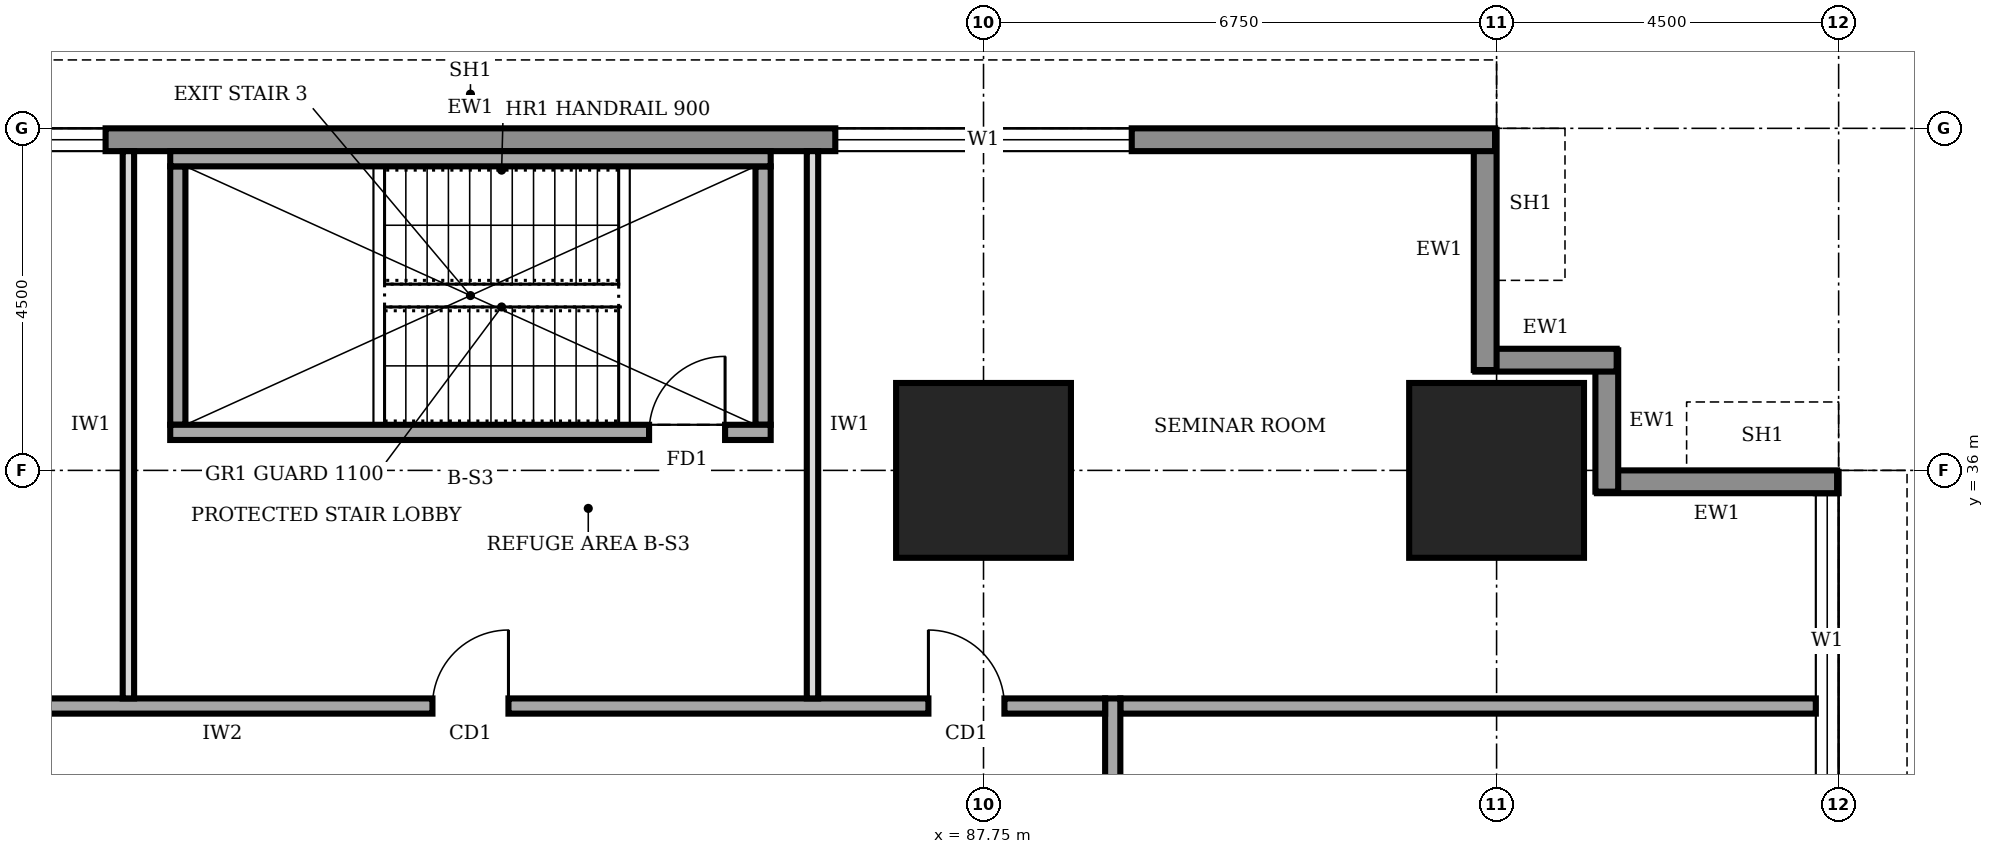
"""IFC4 building model, lengths in metres.
Left out: names, types, materials, properties, quantities, classifications, styles, units other than length and angle.
Written with IfcOpenShell. Run it as: python <this file> out.ifc"""

import sys

from ifc_helpers import new_model, si_unit, direction, frame, frame_2d, origin, origin_2d, place, context, subcontext, project, spatial, rectangle, extrude, element, fill, save


model = new_model("IFC4")
c1 = context("Model", 3, precision=1e-05, world=origin(), true_north=direction((0.0, 1.0)))
c2 = subcontext(c1, "Body", "Model", "MODEL_VIEW")
j1 = project(units=[si_unit("LENGTHUNIT", "METRE"), si_unit("PLANEANGLEUNIT", "RADIAN")], contexts=[c1])
p1 = place(None, origin())
s1 = spatial("IfcSite", under=j1, at=p1, CompositionType="ELEMENT")
p2 = place(p1, origin())
s2 = spatial("IfcBuilding", under=s1, at=p2, CompositionType="ELEMENT")
p3 = place(p2, frame((0.0, 0.0, 33.0)))
s3 = spatial("IfcBuildingStorey", under=s2, at=p3, CompositionType="ELEMENT", Elevation=33.0)
for number, where, z_axis, x_axis in (
    (1, (87.75, 36.0, 0.0), (0.0, 0.0, 1.0), (1.0, 0.0, 0.0)),
    (2, (94.5, 36.0, 0.0), (0.0, 0.0, 1.0), (1.0, 0.0, 0.0)),
):
    element("IfcColumn", number, at=place(p3, frame(where, z_axis=z_axis, x_axis=x_axis)), inside=s3, PredefinedType="COLUMN", context=c2, shape_type="SweptSolid", body=[
        extrude(rectangle(XDim=2.3, YDim=2.3, at=origin_2d()), origin(), (0.0, 0.0, 1.0), 4.0),
    ])
p4 = place(p3, frame((98.85, 4.52, 0.0), z_axis=(0.0, 0.0, 1.0), x_axis=(0.0, 1.0, 0.0)))
e3 = element("IfcWall", 3, at=p4, inside=s3, PredefinedType="STANDARD", context=c2, shape_type="SweptSolid", body=[
    extrude(rectangle(XDim=31.46, YDim=0.3, at=frame_2d((15.73, 0.0))), origin(), (0.0, 0.0, 1.0), 3.75),
])
p5 = place(p4, frame((4.78, 0.0, 0.9)))
e4 = element("IfcOpeningElement", 4, at=p5, cuts=e3, PredefinedType="OPENING", context=c2, shape_type="SweptSolid", body=[
    extrude(rectangle(XDim=3.9, YDim=2.2, at=frame_2d((1.95, 1.1))), frame((0.0, 0.16, 0.0), z_axis=(0.0, -1.0, 0.0), x_axis=(1.0, 0.0, 0.0)), (0.0, 0.0, 1.0), 0.32),
])
p6 = place(p4, frame((9.28, 0.0, 0.9)))
e5 = element("IfcOpeningElement", 5, at=p6, cuts=e3, PredefinedType="OPENING", context=c2, shape_type="SweptSolid", body=[
    extrude(rectangle(XDim=3.9, YDim=2.2, at=frame_2d((1.95, 1.1))), frame((0.0, 0.16, 0.0), z_axis=(0.0, -1.0, 0.0), x_axis=(1.0, 0.0, 0.0)), (0.0, 0.0, 1.0), 0.32),
])
p7 = place(p4, frame((13.78, 0.0, 0.9)))
e6 = element("IfcOpeningElement", 6, at=p7, cuts=e3, PredefinedType="OPENING", context=c2, shape_type="SweptSolid", body=[
    extrude(rectangle(XDim=3.9, YDim=2.2, at=frame_2d((1.95, 1.1))), frame((0.0, 0.16, 0.0), z_axis=(0.0, -1.0, 0.0), x_axis=(1.0, 0.0, 0.0)), (0.0, 0.0, 1.0), 0.32),
])
p8 = place(p4, frame((18.28, 0.0, 0.9)))
e7 = element("IfcOpeningElement", 7, at=p8, cuts=e3, PredefinedType="OPENING", context=c2, shape_type="SweptSolid", body=[
    extrude(rectangle(XDim=3.9, YDim=2.2, at=frame_2d((1.95, 1.1))), frame((0.0, 0.16, 0.0), z_axis=(0.0, -1.0, 0.0), x_axis=(1.0, 0.0, 0.0)), (0.0, 0.0, 1.0), 0.32),
])
p9 = place(p4, frame((22.78, 0.0, 0.9)))
e8 = element("IfcOpeningElement", 8, at=p9, cuts=e3, PredefinedType="OPENING", context=c2, shape_type="SweptSolid", body=[
    extrude(rectangle(XDim=3.9, YDim=2.2, at=frame_2d((1.95, 1.1))), frame((0.0, 0.16, 0.0), z_axis=(0.0, -1.0, 0.0), x_axis=(1.0, 0.0, 0.0)), (0.0, 0.0, 1.0), 0.32),
])
p10 = place(p4, frame((27.28, 0.0, 0.9)))
e9 = element("IfcOpeningElement", 9, at=p10, cuts=e3, PredefinedType="OPENING", context=c2, shape_type="SweptSolid", body=[
    extrude(rectangle(XDim=3.9, YDim=2.2, at=frame_2d((1.95, 1.1))), frame((0.0, 0.16, 0.0), z_axis=(0.0, -1.0, 0.0), x_axis=(1.0, 0.0, 0.0)), (0.0, 0.0, 1.0), 0.32),
])
p11 = place(p3, frame((98.98, 35.85, 0.0), z_axis=(0.0, 0.0, 1.0), x_axis=(-1.0, 0.0, 0.0)))
e10 = element("IfcWall", 10, at=p11, inside=s3, PredefinedType="STANDARD", context=c2, shape_type="SweptSolid", body=[
    extrude(rectangle(XDim=3.16, YDim=0.3, at=frame_2d((1.58, 0.0))), origin(), (0.0, 0.0, 1.0), 2.85),
])
for number, where, z_axis, x_axis in (
    (11, (95.95, 35.72, 0.0), (0.0, 0.0, 1.0), (0.0, 1.0, 0.0)),
    (12, (96.08, 37.45, 0.0), (0.0, 0.0, 1.0), (-1.0, 0.0, 0.0)),
):
    element("IfcWall", number, at=place(p3, frame(where, z_axis=z_axis, x_axis=x_axis)), inside=s3, PredefinedType="STANDARD", context=c2, shape_type="SweptSolid", body=[
        extrude(rectangle(XDim=1.86, YDim=0.3, at=frame_2d((0.93, 0.0))), origin(), (0.0, 0.0, 1.0), 3.75),
    ])
p12 = place(p3, frame((94.35, 37.32, 0.0), z_axis=(0.0, 0.0, 1.0), x_axis=(0.0, 1.0, 0.0)))
e13 = element("IfcWall", 13, at=p12, inside=s3, PredefinedType="STANDARD", context=c2, shape_type="SweptSolid", body=[
    extrude(rectangle(XDim=3.16, YDim=0.3, at=frame_2d((1.58, 0.0))), origin(), (0.0, 0.0, 1.0), 2.85),
])
p13 = place(p3, frame((94.48, 40.35, 0.0), z_axis=(0.0, 0.0, 1.0), x_axis=(-1.0, 0.0, 0.0)))
e14 = element("IfcWall", 14, at=p13, inside=s3, PredefinedType="STANDARD", context=c2, shape_type="SweptSolid", body=[
    extrude(rectangle(XDim=26.96, YDim=0.3, at=frame_2d((13.48, 0.0))), origin(), (0.0, 0.0, 1.0), 3.75),
])
p14 = place(p13, frame((22.78, 0.0, 0.9)))
e15 = element("IfcOpeningElement", 15, at=p14, cuts=e14, PredefinedType="OPENING", context=c2, shape_type="SweptSolid", body=[
    extrude(rectangle(XDim=3.9, YDim=2.2, at=frame_2d((1.95, 1.1))), frame((0.0, 0.16, 0.0), z_axis=(0.0, -1.0, 0.0), x_axis=(1.0, 0.0, 0.0)), (0.0, 0.0, 1.0), 0.32),
])
p15 = place(p13, frame((18.28, 0.0, 0.9)))
e16 = element("IfcOpeningElement", 16, at=p15, cuts=e14, PredefinedType="OPENING", context=c2, shape_type="SweptSolid", body=[
    extrude(rectangle(XDim=3.9, YDim=2.2, at=frame_2d((1.95, 1.1))), frame((0.0, 0.16, 0.0), z_axis=(0.0, -1.0, 0.0), x_axis=(1.0, 0.0, 0.0)), (0.0, 0.0, 1.0), 0.32),
])
p16 = place(p13, frame((4.78, 0.0, 0.9)))
e17 = element("IfcOpeningElement", 17, at=p16, cuts=e14, PredefinedType="OPENING", context=c2, shape_type="SweptSolid", body=[
    extrude(rectangle(XDim=3.9, YDim=2.2, at=frame_2d((1.95, 1.1))), frame((0.0, 0.16, 0.0), z_axis=(0.0, -1.0, 0.0), x_axis=(1.0, 0.0, 0.0)), (0.0, 0.0, 1.0), 0.32),
])
p17 = place(p3, frame((89.45, 9.2, 0.0), z_axis=(0.0, 0.0, 1.0), x_axis=(0.0, 1.0, 0.0)))
e18 = element("IfcWall", 18, at=p17, inside=s3, PredefinedType="SOLIDWALL", context=c2, shape_type="SweptSolid", body=[
    extrude(rectangle(XDim=23.8, YDim=0.2, at=frame_2d((11.9, 0.0))), origin(), (0.0, 0.0, 1.0), 3.75),
])
p18 = place(p17, frame((1.55, 0.0, 0.0)))
e19 = element("IfcOpeningElement", 19, at=p18, cuts=e18, PredefinedType="OPENING", context=c2, shape_type="SweptSolid", body=[
    extrude(rectangle(XDim=1.0, YDim=2.1, at=frame_2d((0.5, 1.05))), frame((0.0, 0.11, 0.0), z_axis=(0.0, -1.0, 0.0), x_axis=(1.0, 0.0, 0.0)), (0.0, 0.0, 1.0), 0.22),
])
p19 = place(p17, frame((5.05, 0.0, 0.0)))
e20 = element("IfcOpeningElement", 20, at=p19, cuts=e18, PredefinedType="OPENING", context=c2, shape_type="SweptSolid", body=[
    extrude(rectangle(XDim=0.9, YDim=2.1, at=frame_2d((0.45, 1.05))), frame((0.0, 0.11, 0.0), z_axis=(0.0, -1.0, 0.0), x_axis=(1.0, 0.0, 0.0)), (0.0, 0.0, 1.0), 0.22),
])
p20 = place(p17, frame((8.25, 0.0, 0.0)))
e21 = element("IfcOpeningElement", 21, at=p20, cuts=e18, PredefinedType="OPENING", context=c2, shape_type="SweptSolid", body=[
    extrude(rectangle(XDim=0.9, YDim=2.1, at=frame_2d((0.45, 1.05))), frame((0.0, 0.11, 0.0), z_axis=(0.0, -1.0, 0.0), x_axis=(1.0, 0.0, 0.0)), (0.0, 0.0, 1.0), 0.22),
])
p21 = place(p17, frame((13.8, 0.0, 0.0)))
e22 = element("IfcOpeningElement", 22, at=p21, cuts=e18, PredefinedType="OPENING", context=c2, shape_type="SweptSolid", body=[
    extrude(rectangle(XDim=0.9, YDim=2.1, at=frame_2d((0.45, 1.05))), frame((0.0, 0.11, 0.0), z_axis=(0.0, -1.0, 0.0), x_axis=(1.0, 0.0, 0.0)), (0.0, 0.0, 1.0), 0.22),
])
p22 = place(p17, frame((16.3, 0.0, 0.0)))
e23 = element("IfcOpeningElement", 23, at=p22, cuts=e18, PredefinedType="OPENING", context=c2, shape_type="SweptSolid", body=[
    extrude(rectangle(XDim=1.0, YDim=2.1, at=frame_2d((0.5, 1.05))), frame((0.0, 0.11, 0.0), z_axis=(0.0, -1.0, 0.0), x_axis=(1.0, 0.0, 0.0)), (0.0, 0.0, 1.0), 0.22),
])
p23 = place(p17, frame((11.2, 0.0, 0.0)))
e24 = element("IfcOpeningElement", 24, at=p23, cuts=e18, PredefinedType="OPENING", context=c2, shape_type="SweptSolid", body=[
    extrude(rectangle(XDim=1.0, YDim=2.1, at=frame_2d((0.5, 1.05))), frame((0.0, 0.11, 0.0), z_axis=(0.0, -1.0, 0.0), x_axis=(1.0, 0.0, 0.0)), (0.0, 0.0, 1.0), 0.22),
])
p24 = place(p17, frame((20.3, 0.0, 0.0)))
e25 = element("IfcOpeningElement", 25, at=p24, cuts=e18, PredefinedType="OPENING", context=c2, shape_type="SweptSolid", body=[
    extrude(rectangle(XDim=1.0, YDim=2.1, at=frame_2d((0.5, 1.05))), frame((0.0, 0.11, 0.0), z_axis=(0.0, -1.0, 0.0), x_axis=(1.0, 0.0, 0.0)), (0.0, 0.0, 1.0), 0.22),
])
p25 = place(p3, frame((89.35, 32.9, 0.0), z_axis=(0.0, 0.0, 1.0), x_axis=(-1.0, 0.0, 0.0)))
e26 = element("IfcWall", 26, at=p25, inside=s3, PredefinedType="SOLIDWALL", context=c2, shape_type="SweptSolid", body=[
    extrude(rectangle(XDim=16.9, YDim=0.2, at=frame_2d((8.45, 0.0))), origin(), (0.0, 0.0, 1.0), 3.75),
])
p26 = place(p25, frame((14.375, 0.0, 0.0)))
e27 = element("IfcOpeningElement", 27, at=p26, cuts=e26, PredefinedType="OPENING", context=c2, shape_type="SweptSolid", body=[
    extrude(rectangle(XDim=1.0, YDim=2.1, at=frame_2d((0.5, 1.05))), frame((0.0, 0.11, 0.0), z_axis=(0.0, -1.0, 0.0), x_axis=(1.0, 0.0, 0.0)), (0.0, 0.0, 1.0), 0.22),
])
p27 = place(p25, frame((7.85, 0.0, 0.0)))
e28 = element("IfcOpeningElement", 28, at=p27, cuts=e26, PredefinedType="OPENING", context=c2, shape_type="SweptSolid", body=[
    extrude(rectangle(XDim=1.0, YDim=2.1, at=frame_2d((0.5, 1.05))), frame((0.0, 0.11, 0.0), z_axis=(0.0, -1.0, 0.0), x_axis=(1.0, 0.0, 0.0)), (0.0, 0.0, 1.0), 0.22),
])
p28 = place(p25, frame((1.325, 0.0, 0.0)))
e29 = element("IfcOpeningElement", 29, at=p28, cuts=e26, PredefinedType="OPENING", context=c2, shape_type="SweptSolid", body=[
    extrude(rectangle(XDim=1.0, YDim=2.1, at=frame_2d((0.5, 1.05))), frame((0.0, 0.11, 0.0), z_axis=(0.0, -1.0, 0.0), x_axis=(1.0, 0.0, 0.0)), (0.0, 0.0, 1.0), 0.22),
])
p29 = place(p3, frame((89.55, 32.9, 0.0), z_axis=(0.0, 0.0, 1.0), x_axis=(1.0, 0.0, 0.0)))
e30 = element("IfcWall", 30, at=p29, inside=s3, PredefinedType="SOLIDWALL", context=c2, shape_type="SweptSolid", body=[
    extrude(rectangle(XDim=9.15, YDim=0.2, at=frame_2d((4.575, 0.0))), origin(), (0.0, 0.0, 1.0), 3.75),
])
for number, where, z_axis, x_axis in (
    (31, (76.5, 33.0, 0.0), (0.0, 0.0, 1.0), (0.0, 1.0, 0.0)),
    (32, (85.5, 33.0, 0.0), (0.0, 0.0, 1.0), (0.0, 1.0, 0.0)),
):
    element("IfcWall", number, at=place(p3, frame(where, z_axis=z_axis, x_axis=x_axis)), inside=s3, PredefinedType="PARTITIONING", context=c2, shape_type="SweptSolid", body=[
        extrude(rectangle(XDim=7.2, YDim=0.15, at=frame_2d((3.6, 0.0))), origin(), (0.0, 0.0, 1.0), 3.75),
    ])
p30 = place(p3, frame((77.05, 36.5, 0.0), z_axis=(0.0, 0.0, 1.0), x_axis=(1.0, 0.0, 0.0)))
e33 = element("IfcWall", 33, at=p30, inside=s3, PredefinedType="SOLIDWALL", context=c2, shape_type="SweptSolid", body=[
    extrude(rectangle(XDim=7.9, YDim=0.2, at=frame_2d((3.95, 0.0))), origin(), (0.0, 0.0, 1.0), 3.75),
])
p31 = place(p30, frame((6.3, 0.0, 0.0)))
e34 = element("IfcOpeningElement", 34, at=p31, cuts=e33, PredefinedType="OPENING", context=c2, shape_type="SweptSolid", body=[
    extrude(rectangle(XDim=1.0, YDim=2.1, at=frame_2d((0.5, 1.05))), frame((0.0, 0.11, 0.0), z_axis=(0.0, -1.0, 0.0), x_axis=(1.0, 0.0, 0.0)), (0.0, 0.0, 1.0), 0.22),
])
p32 = place(p3, frame((77.05, 40.1, 0.0), z_axis=(0.0, 0.0, 1.0), x_axis=(1.0, 0.0, 0.0)))
e35 = element("IfcWall", 35, at=p32, inside=s3, PredefinedType="SOLIDWALL", context=c2, shape_type="SweptSolid", body=[
    extrude(rectangle(XDim=7.9, YDim=0.2, at=frame_2d((3.95, 0.0))), origin(), (0.0, 0.0, 1.0), 3.75),
])
for number, where, z_axis, x_axis in (
    (36, (77.15, 36.6, 0.0), (0.0, 0.0, 1.0), (0.0, 1.0, 0.0)),
    (37, (84.85, 36.6, 0.0), (0.0, 0.0, 1.0), (0.0, 1.0, 0.0)),
):
    element("IfcWall", number, at=place(p3, frame(where, z_axis=z_axis, x_axis=x_axis)), inside=s3, PredefinedType="SOLIDWALL", context=c2, shape_type="SweptSolid", body=[
        extrude(rectangle(XDim=3.4, YDim=0.2, at=frame_2d((1.7, 0.0))), origin(), (0.0, 0.0, 1.0), 3.75),
    ])
p33 = place(p10, origin())
e38 = element("IfcWindow", 38, at=p33, inside=s3, PartitioningType="SINGLE_PANEL", PredefinedType="WINDOW", context=c2, shape_type="SweptSolid", body=[
    extrude(rectangle(XDim=3.9, YDim=2.2, at=frame_2d((1.95, 1.1))), frame((0.0, 0.03, 0.0), z_axis=(0.0, -1.0, 0.0), x_axis=(1.0, 0.0, 0.0)), (0.0, 0.0, 1.0), 0.06),
])
fill(e9, e38)
p34 = place(p15, origin())
e39 = element("IfcWindow", 39, at=p34, inside=s3, PartitioningType="SINGLE_PANEL", PredefinedType="WINDOW", context=c2, shape_type="SweptSolid", body=[
    extrude(rectangle(XDim=3.9, YDim=2.2, at=frame_2d((1.95, 1.1))), frame((0.0, 0.03, 0.0), z_axis=(0.0, -1.0, 0.0), x_axis=(1.0, 0.0, 0.0)), (0.0, 0.0, 1.0), 0.06),
])
fill(e16, e39)
p35 = place(p16, origin())
e40 = element("IfcWindow", 40, at=p35, inside=s3, PartitioningType="SINGLE_PANEL", PredefinedType="WINDOW", context=c2, shape_type="SweptSolid", body=[
    extrude(rectangle(XDim=3.9, YDim=2.2, at=frame_2d((1.95, 1.1))), frame((0.0, 0.03, 0.0), z_axis=(0.0, -1.0, 0.0), x_axis=(1.0, 0.0, 0.0)), (0.0, 0.0, 1.0), 0.06),
])
fill(e17, e40)
p36 = place(p27, frame((1.0, 0.0, 0.0), z_axis=(0.0, 0.0, 1.0), x_axis=(-1.0, 0.0, 0.0)))
e41 = element("IfcDoor", 41, at=p36, inside=s3, OperationType="SINGLE_SWING_RIGHT", PredefinedType="DOOR", context=c2, shape_type="SweptSolid", body=[
    extrude(rectangle(XDim=1.0, YDim=2.1, at=frame_2d((0.5, 1.05))), frame((0.0, 0.025, 0.0), z_axis=(0.0, -1.0, 0.0), x_axis=(1.0, 0.0, 0.0)), (0.0, 0.0, 1.0), 0.05),
])
fill(e28, e41)
p37 = place(p28, frame((1.0, 0.0, 0.0), z_axis=(0.0, 0.0, 1.0), x_axis=(-1.0, 0.0, 0.0)))
e42 = element("IfcDoor", 42, at=p37, inside=s3, OperationType="SINGLE_SWING_LEFT", PredefinedType="DOOR", context=c2, shape_type="SweptSolid", body=[
    extrude(rectangle(XDim=1.0, YDim=2.1, at=frame_2d((0.5, 1.05))), frame((0.0, 0.025, 0.0), z_axis=(0.0, -1.0, 0.0), x_axis=(1.0, 0.0, 0.0)), (0.0, 0.0, 1.0), 0.05),
])
fill(e29, e42)
p38 = place(p31, origin())
e43 = element("IfcDoor", 43, at=p38, inside=s3, OperationType="SINGLE_SWING_RIGHT", PredefinedType="DOOR", context=c2, shape_type="SweptSolid", body=[
    extrude(rectangle(XDim=1.0, YDim=2.1, at=frame_2d((0.5, 1.05))), frame((0.0, 0.025, 0.0), z_axis=(0.0, -1.0, 0.0), x_axis=(1.0, 0.0, 0.0)), (0.0, 0.0, 1.0), 0.05),
])
fill(e34, e43)
save(model, sys.argv[1])
